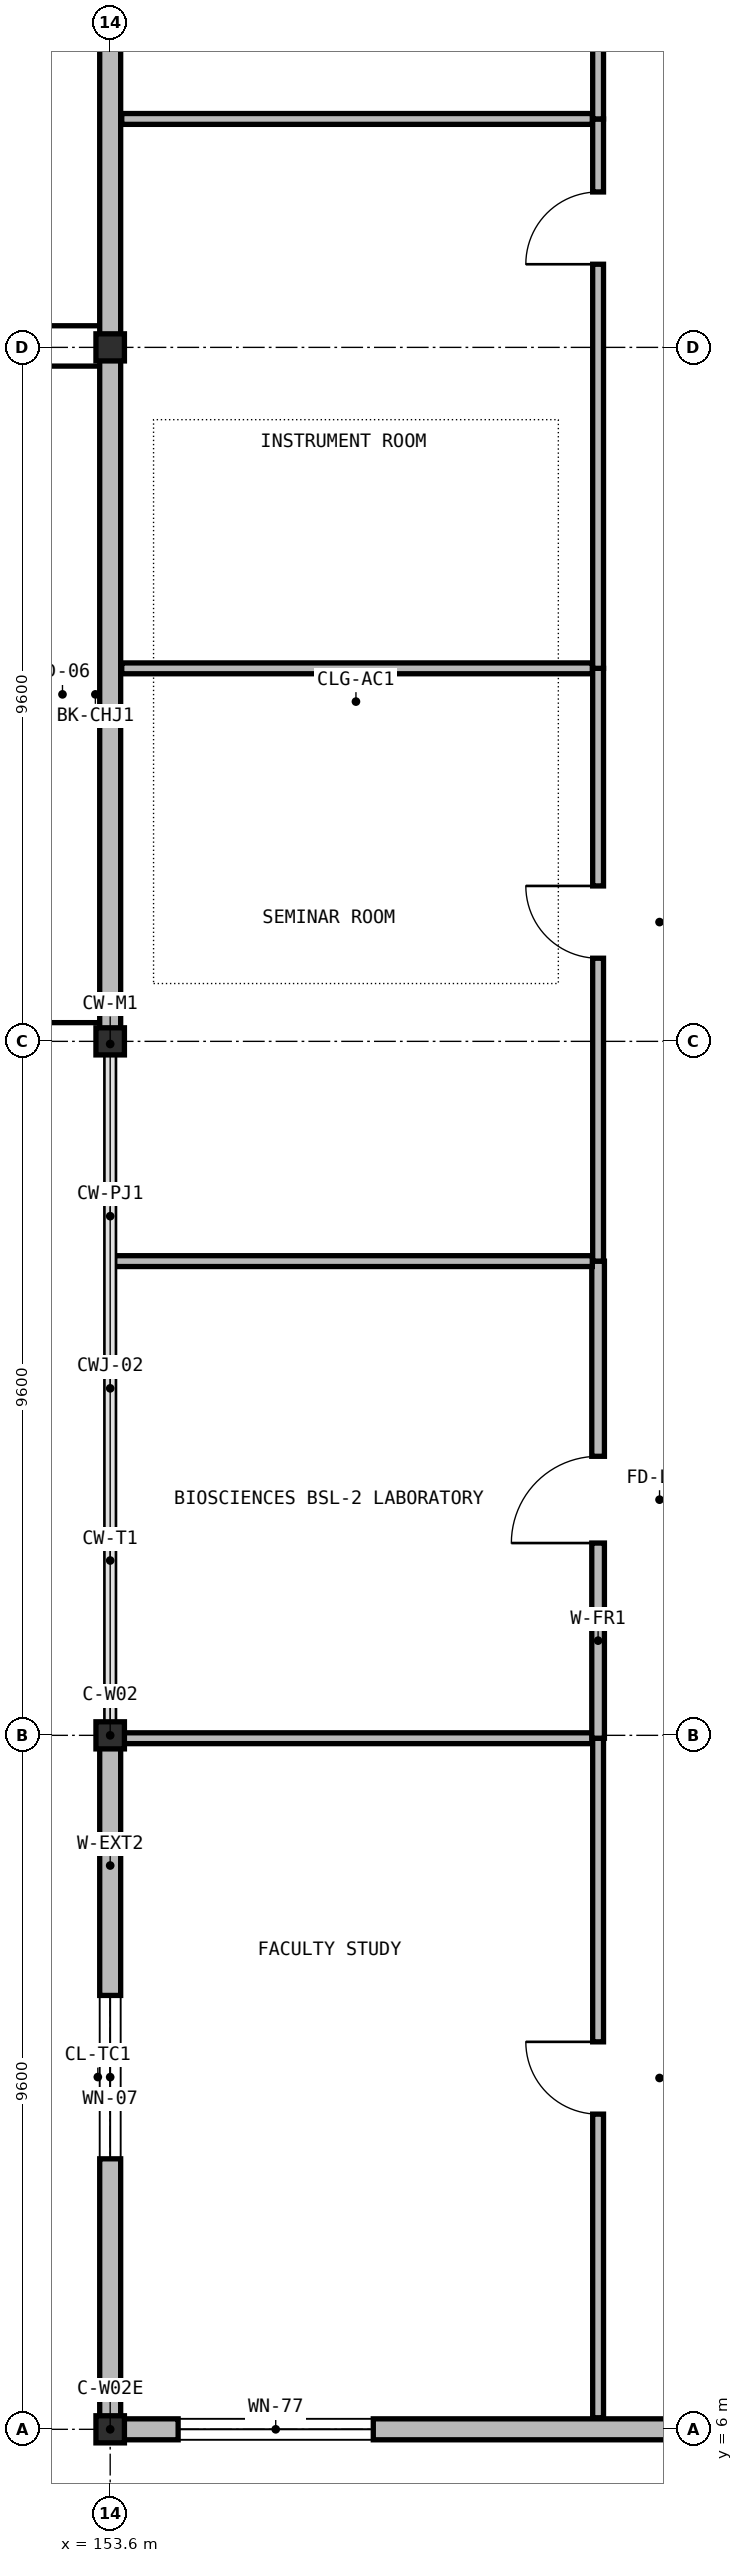
"""IFC4 building model, lengths in metres.
Left out: names, types, materials, properties, quantities, classifications, styles, units other than length and angle.
Written with IfcOpenShell. Run it as: python <this file> out.ifc"""

import sys

from ifc_helpers import new_model, si_unit, direction, frame, frame_2d, origin, origin_2d, place, context, subcontext, project, spatial, rectangle, i_section, extrude, element, fill, save


model = new_model("IFC4")
c1 = context("Model", 3, precision=1e-05, world=origin(), true_north=direction((0.0, 1.0)))
c2 = subcontext(c1, "Body", "Model", "MODEL_VIEW")
j1 = project(units=[si_unit("LENGTHUNIT", "METRE"), si_unit("PLANEANGLEUNIT", "RADIAN")], contexts=[c1])
p1 = place(None, origin())
s1 = spatial("IfcSite", under=j1, at=p1, CompositionType="ELEMENT")
p2 = place(p1, origin())
s2 = spatial("IfcBuilding", under=s1, at=p2, CompositionType="ELEMENT")
p3 = place(p2, frame((0.0, 0.0, 9.8)))
s3 = spatial("IfcBuildingStorey", under=s2, at=p3, CompositionType="ELEMENT", Elevation=9.8)
for number, where, z_axis, x_axis in (
    (1, (153.6, 6.0, 0.0), (0.0, 0.0, 1.0), (1.0, 0.0, 0.0)),
    (2, (153.6, 15.6, 0.0), (0.0, 0.0, 1.0), (1.0, 0.0, 0.0)),
    (3, (153.6, 25.2, 0.0), (0.0, 0.0, 1.0), (1.0, 0.0, 0.0)),
    (4, (153.6, 34.8, 0.0), (0.0, 0.0, 1.0), (1.0, 0.0, 0.0)),
):
    element("IfcColumn", number, at=place(p3, frame(where, z_axis=z_axis, x_axis=x_axis)), inside=s3, PredefinedType="COLUMN", context=c2, shape_type="SweptSolid", body=[
        extrude(i_section(OverallWidth=0.394, OverallDepth=0.375, WebThickness=0.02, FlangeThickness=0.032, at=origin_2d()), origin(), (0.0, 0.0, 1.0), 4.55),
    ])
p4 = place(p3, frame((153.6, 6.149, 0.0), z_axis=(0.0, 0.0, 1.0), x_axis=(0.0, 1.0, 0.0)))
e5 = element("IfcWall", 5, at=p4, inside=s3, PredefinedType="SOLIDWALL", context=c2, shape_type="SweptSolid", body=[
    extrude(rectangle(XDim=9.447, YDim=0.29, at=frame_2d((4.724, 0.0))), origin(), (0.0, 0.0, 1.0), 3.893),
])
p5 = place(p4, frame((3.593, 0.0, 0.95)))
e6 = element("IfcOpeningElement", 6, at=p5, cuts=e5, PredefinedType="OPENING", context=c2, shape_type="SweptSolid", body=[
    extrude(rectangle(XDim=2.26, YDim=1.72, at=frame_2d((1.13, 0.86))), frame((0.0, 0.155, 0.0), z_axis=(0.0, -1.0, 0.0), x_axis=(1.0, 0.0, 0.0)), (0.0, 0.0, 1.0), 0.31),
])
p6 = place(p3, frame((153.6, 25.204, 0.0), z_axis=(0.0, 0.0, 1.0), x_axis=(0.0, 1.0, 0.0)))
e7 = element("IfcWall", 7, at=p6, inside=s3, PredefinedType="SOLIDWALL", context=c2, shape_type="SweptSolid", body=[
    extrude(rectangle(XDim=9.592, YDim=0.29, at=frame_2d((4.796, 0.0))), origin(), (0.0, 0.0, 1.0), 3.893),
])
p7 = place(p3, frame((153.6, 34.804, 0.0), z_axis=(0.0, 0.0, 1.0), x_axis=(0.0, 1.0, 0.0)))
e8 = element("IfcWall", 8, at=p7, inside=s3, PredefinedType="SOLIDWALL", context=c2, shape_type="SweptSolid", body=[
    extrude(rectangle(XDim=9.592, YDim=0.29, at=frame_2d((4.796, 0.0))), origin(), (0.0, 0.0, 1.0), 3.893),
])
p8 = place(p3, frame((163.196, 6.0, 0.0), z_axis=(0.0, 0.0, 1.0), x_axis=(-1.0, 0.0, 0.0)))
e9 = element("IfcWall", 9, at=p8, inside=s3, PredefinedType="SOLIDWALL", context=c2, shape_type="SweptSolid", body=[
    extrude(rectangle(XDim=9.741, YDim=0.29, at=frame_2d((4.871, 0.0))), origin(), (0.0, 0.0, 1.0), 3.884),
])
p9 = place(p8, frame((5.956, 0.0, 0.95)))
e10 = element("IfcOpeningElement", 10, at=p9, cuts=e9, PredefinedType="OPENING", context=c2, shape_type="SweptSolid", body=[
    extrude(rectangle(XDim=2.7, YDim=1.72, at=frame_2d((1.35, 0.86))), frame((0.0, 0.155, 0.0), z_axis=(0.0, -1.0, 0.0), x_axis=(1.0, 0.0, 0.0)), (0.0, 0.0, 1.0), 0.31),
])
p10 = place(p3, frame((160.35, 6.16, 0.0), z_axis=(0.0, 0.0, 1.0), x_axis=(0.0, 1.0, 0.0)))
e11 = element("IfcWall", 11, at=p10, inside=s3, PredefinedType="PARTITIONING", context=c2, shape_type="SweptSolid", body=[
    extrude(rectangle(XDim=9.4, YDim=0.15, at=frame_2d((4.7, 0.0))), origin(), (0.0, 0.0, 1.0), 4.3),
])
p11 = place(p10, frame((4.2, 0.0, 0.0)))
e12 = element("IfcOpeningElement", 12, at=p11, cuts=e11, PredefinedType="OPENING", context=c2, shape_type="SweptSolid", body=[
    extrude(rectangle(XDim=1.0, YDim=2.2, at=frame_2d((0.5, 1.1))), frame((0.0, 0.085, 0.0), z_axis=(0.0, -1.0, 0.0), x_axis=(1.0, 0.0, 0.0)), (0.0, 0.0, 1.0), 0.17),
])
p12 = place(p3, frame((153.76, 15.56, 0.0), z_axis=(0.0, 0.0, 1.0), x_axis=(1.0, 0.0, 0.0)))
e13 = element("IfcWall", 13, at=p12, inside=s3, PredefinedType="PARTITIONING", context=c2, shape_type="SweptSolid", body=[
    extrude(rectangle(XDim=6.51, YDim=0.15, at=frame_2d((3.255, 0.0))), origin(), (0.0, 0.0, 1.0), 3.815),
])
p13 = place(p3, frame((160.35, 15.56, 0.0), z_axis=(0.0, 0.0, 1.0), x_axis=(0.0, 1.0, 0.0)))
e14 = element("IfcWall", 14, at=p13, inside=s3, PredefinedType="PARTITIONING", context=c2, shape_type="SweptSolid", body=[
    extrude(rectangle(XDim=6.6, YDim=0.175, at=frame_2d((3.3, 0.0))), origin(), (0.0, 0.0, 1.0), 4.3),
])
p14 = place(p13, frame((2.7, 0.0, 0.0)))
e15 = element("IfcOpeningElement", 15, at=p14, cuts=e14, PredefinedType="OPENING", context=c2, shape_type="SweptSolid", body=[
    extrude(rectangle(XDim=1.2, YDim=2.2, at=frame_2d((0.6, 1.1))), frame((0.0, 0.097, 0.0), z_axis=(0.0, -1.0, 0.0), x_axis=(1.0, 0.0, 0.0)), (0.0, 0.0, 1.0), 0.195),
])
p15 = place(p3, frame((153.66, 22.16, 0.0), z_axis=(0.0, 0.0, 1.0), x_axis=(1.0, 0.0, 0.0)))
e16 = element("IfcWall", 16, at=p15, inside=s3, PredefinedType="PARTITIONING", context=c2, shape_type="SweptSolid", body=[
    extrude(rectangle(XDim=6.61, YDim=0.15, at=frame_2d((3.305, 0.0))), origin(), (0.0, 0.0, 1.0), 4.3),
])
p16 = place(p3, frame((160.35, 22.16, 0.0), z_axis=(0.0, 0.0, 1.0), x_axis=(0.0, 1.0, 0.0)))
e17 = element("IfcWall", 17, at=p16, inside=s3, PredefinedType="PARTITIONING", context=c2, shape_type="SweptSolid", body=[
    extrude(rectangle(XDim=8.2, YDim=0.15, at=frame_2d((4.1, 0.0))), origin(), (0.0, 0.0, 1.0), 4.3),
])
p17 = place(p16, frame((4.19, 0.0, 0.0)))
e18 = element("IfcOpeningElement", 18, at=p17, cuts=e17, PredefinedType="OPENING", context=c2, shape_type="SweptSolid", body=[
    extrude(rectangle(XDim=1.0, YDim=2.2, at=frame_2d((0.5, 1.1))), frame((0.0, 0.085, 0.0), z_axis=(0.0, -1.0, 0.0), x_axis=(1.0, 0.0, 0.0)), (0.0, 0.0, 1.0), 0.17),
])
p18 = place(p3, frame((153.76, 30.36, 0.0), z_axis=(0.0, 0.0, 1.0), x_axis=(1.0, 0.0, 0.0)))
e19 = element("IfcWall", 19, at=p18, inside=s3, PredefinedType="PARTITIONING", context=c2, shape_type="SweptSolid", body=[
    extrude(rectangle(XDim=6.51, YDim=0.15, at=frame_2d((3.255, 0.0))), origin(), (0.0, 0.0, 1.0), 4.3),
])
p19 = place(p3, frame((160.35, 30.36, 0.0), z_axis=(0.0, 0.0, 1.0), x_axis=(0.0, 1.0, 0.0)))
e20 = element("IfcWall", 20, at=p19, inside=s3, PredefinedType="PARTITIONING", context=c2, shape_type="SweptSolid", body=[
    extrude(rectangle(XDim=7.6, YDim=0.15, at=frame_2d((3.8, 0.0))), origin(), (0.0, 0.0, 1.0), 4.3),
])
p20 = place(p19, frame((5.59, 0.0, 0.0)))
e21 = element("IfcOpeningElement", 21, at=p20, cuts=e20, PredefinedType="OPENING", context=c2, shape_type="SweptSolid", body=[
    extrude(rectangle(XDim=1.0, YDim=2.2, at=frame_2d((0.5, 1.1))), frame((0.0, 0.085, 0.0), z_axis=(0.0, -1.0, 0.0), x_axis=(1.0, 0.0, 0.0)), (0.0, 0.0, 1.0), 0.17),
])
p21 = place(p3, frame((153.76, 37.96, 0.0), z_axis=(0.0, 0.0, 1.0), x_axis=(1.0, 0.0, 0.0)))
e22 = element("IfcWall", 22, at=p21, inside=s3, PredefinedType="PARTITIONING", context=c2, shape_type="SweptSolid", body=[
    extrude(rectangle(XDim=6.51, YDim=0.15, at=frame_2d((3.255, 0.0))), origin(), (0.0, 0.0, 1.0), 4.3),
])
p22 = place(p3, frame((160.35, 37.96, 0.0), z_axis=(0.0, 0.0, 1.0), x_axis=(0.0, 1.0, 0.0)))
e23 = element("IfcWall", 23, at=p22, inside=s3, PredefinedType="PARTITIONING", context=c2, shape_type="SweptSolid", body=[
    extrude(rectangle(XDim=9.4, YDim=0.15, at=frame_2d((4.7, 0.0))), origin(), (0.0, 0.0, 1.0), 4.3),
])
p23 = place(p22, frame((4.2, 0.0, 0.0)))
e24 = element("IfcOpeningElement", 24, at=p23, cuts=e23, PredefinedType="OPENING", context=c2, shape_type="SweptSolid", body=[
    extrude(rectangle(XDim=1.0, YDim=2.2, at=frame_2d((0.5, 1.1))), frame((0.0, 0.085, 0.0), z_axis=(0.0, -1.0, 0.0), x_axis=(1.0, 0.0, 0.0)), (0.0, 0.0, 1.0), 0.17),
])
p24 = place(p5, origin())
e25 = element("IfcWindow", 25, at=p24, inside=s3, PartitioningType="SINGLE_PANEL", PredefinedType="WINDOW", context=c2, shape_type="SweptSolid", body=[
    extrude(rectangle(XDim=2.26, YDim=1.72, at=frame_2d((1.13, 0.86))), frame((0.0, 0.03, 0.0), z_axis=(0.0, -1.0, 0.0), x_axis=(1.0, 0.0, 0.0)), (0.0, 0.0, 1.0), 0.06),
])
fill(e6, e25)
p25 = place(p9, origin())
e26 = element("IfcWindow", 26, at=p25, inside=s3, PartitioningType="SINGLE_PANEL", PredefinedType="WINDOW", context=c2, shape_type="SweptSolid", body=[
    extrude(rectangle(XDim=2.7, YDim=1.72, at=frame_2d((1.35, 0.86))), frame((0.0, 0.03, 0.0), z_axis=(0.0, -1.0, 0.0), x_axis=(1.0, 0.0, 0.0)), (0.0, 0.0, 1.0), 0.06),
])
fill(e10, e26)
p26 = place(p11, origin())
e27 = element("IfcDoor", 27, at=p26, inside=s3, OperationType="SINGLE_SWING_RIGHT", PredefinedType="DOOR", context=c2, shape_type="SweptSolid", body=[
    extrude(rectangle(XDim=1.0, YDim=2.2, at=frame_2d((0.5, 1.1))), frame((0.0, 0.025, 0.0), z_axis=(0.0, -1.0, 0.0), x_axis=(1.0, 0.0, 0.0)), (0.0, 0.0, 1.0), 0.05),
])
fill(e12, e27)
p27 = place(p14, origin())
e28 = element("IfcDoor", 28, at=p27, inside=s3, OperationType="SINGLE_SWING_LEFT", PredefinedType="DOOR", context=c2, shape_type="SweptSolid", body=[
    extrude(rectangle(XDim=1.2, YDim=2.2, at=frame_2d((0.6, 1.1))), frame((0.0, 0.025, 0.0), z_axis=(0.0, -1.0, 0.0), x_axis=(1.0, 0.0, 0.0)), (0.0, 0.0, 1.0), 0.05),
])
fill(e15, e28)
p28 = place(p17, origin())
e29 = element("IfcDoor", 29, at=p28, inside=s3, OperationType="SINGLE_SWING_RIGHT", PredefinedType="DOOR", context=c2, shape_type="SweptSolid", body=[
    extrude(rectangle(XDim=1.0, YDim=2.2, at=frame_2d((0.5, 1.1))), frame((0.0, 0.025, 0.0), z_axis=(0.0, -1.0, 0.0), x_axis=(1.0, 0.0, 0.0)), (0.0, 0.0, 1.0), 0.05),
])
fill(e18, e29)
p29 = place(p20, origin())
e30 = element("IfcDoor", 30, at=p29, inside=s3, OperationType="SINGLE_SWING_LEFT", PredefinedType="DOOR", context=c2, shape_type="SweptSolid", body=[
    extrude(rectangle(XDim=1.0, YDim=2.2, at=frame_2d((0.5, 1.1))), frame((0.0, 0.025, 0.0), z_axis=(0.0, -1.0, 0.0), x_axis=(1.0, 0.0, 0.0)), (0.0, 0.0, 1.0), 0.05),
])
fill(e21, e30)
save(model, sys.argv[1])
